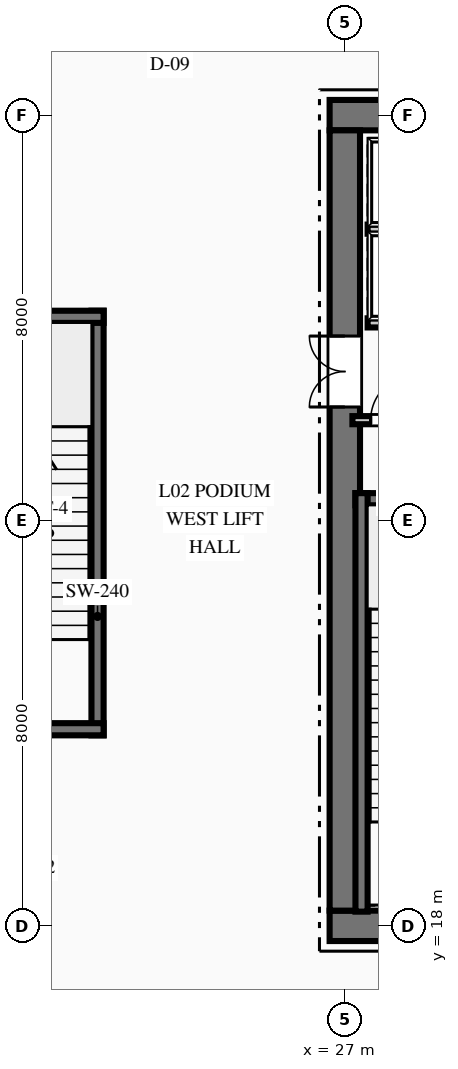
"""IFC4 building model, lengths in metres.
Left out: names, types, materials, properties, quantities, classifications, styles, units other than length and angle.
Written with IfcOpenShell. Run it as: python <this file> out.ifc"""

import sys

from ifc_helpers import new_model, si_unit, direction, frame, frame_2d, origin, place, context, subcontext, project, spatial, rectangle, extrude, element, fill, save


model = new_model("IFC4")
c1 = context("Model", 3, precision=1e-05, world=origin(), true_north=direction((0.0, 1.0)))
c2 = subcontext(c1, "Body", "Model", "MODEL_VIEW")
j1 = project(units=[si_unit("LENGTHUNIT", "METRE"), si_unit("PLANEANGLEUNIT", "RADIAN")], contexts=[c1])
p1 = place(None, origin())
s1 = spatial("IfcSite", under=j1, at=p1, CompositionType="ELEMENT")
p2 = place(p1, origin())
s2 = spatial("IfcBuilding", under=s1, at=p2, CompositionType="ELEMENT")
p3 = place(p2, frame((0.0, 0.0, 11.4)))
s3 = spatial("IfcBuildingStorey", under=s2, at=p3, CompositionType="ELEMENT", Elevation=11.4)
p4 = place(p3, frame((26.7, 18.0, 0.0), z_axis=(0.0, 0.0, 1.0), x_axis=(1.0, 0.0, 0.0)))
e1 = element("IfcWall", 1, at=p4, inside=s3, PredefinedType="SHEAR", context=c2, shape_type="SweptSolid", body=[
    extrude(rectangle(XDim=18.6, YDim=0.6, at=frame_2d((9.3, 0.0))), origin(), (0.0, 0.0, 1.0), 5.4),
])
p5 = place(p4, frame((7.4, 0.0, 0.0)))
e2 = element("IfcOpeningElement", 2, at=p5, cuts=e1, PredefinedType="OPENING", context=c2, shape_type="SweptSolid", body=[
    extrude(rectangle(XDim=1.1, YDim=2.15, at=frame_2d((0.55, 1.075))), frame((0.0, 0.31, 0.0), z_axis=(0.0, -1.0, 0.0), x_axis=(1.0, 0.0, 0.0)), (0.0, 0.0, 1.0), 0.62),
])
p6 = place(p4, frame((10.1, 0.0, 0.0)))
e3 = element("IfcOpeningElement", 3, at=p6, cuts=e1, PredefinedType="OPENING", context=c2, shape_type="SweptSolid", body=[
    extrude(rectangle(XDim=1.1, YDim=2.15, at=frame_2d((0.55, 1.075))), frame((0.0, 0.31, 0.0), z_axis=(0.0, -1.0, 0.0), x_axis=(1.0, 0.0, 0.0)), (0.0, 0.0, 1.0), 0.62),
])
p7 = place(p3, frame((26.7, 34.0, 0.0), z_axis=(0.0, 0.0, 1.0), x_axis=(1.0, 0.0, 0.0)))
e4 = element("IfcWall", 4, at=p7, inside=s3, PredefinedType="SHEAR", context=c2, shape_type="SweptSolid", body=[
    extrude(rectangle(XDim=18.6, YDim=0.6, at=frame_2d((9.3, 0.0))), origin(), (0.0, 0.0, 1.0), 5.4),
])
p8 = place(p7, frame((1.265, 0.0, 0.0)))
e5 = element("IfcOpeningElement", 5, at=p8, cuts=e4, PredefinedType="OPENING", context=c2, shape_type="SweptSolid", body=[
    extrude(rectangle(XDim=1.1, YDim=2.15, at=frame_2d((0.55, 1.075))), frame((0.0, 0.31, 0.0), z_axis=(0.0, -1.0, 0.0), x_axis=(1.0, 0.0, 0.0)), (0.0, 0.0, 1.0), 0.62),
])
p9 = place(p7, frame((3.515, 0.0, 0.0)))
e6 = element("IfcOpeningElement", 6, at=p9, cuts=e4, PredefinedType="OPENING", context=c2, shape_type="SweptSolid", body=[
    extrude(rectangle(XDim=1.1, YDim=2.15, at=frame_2d((0.55, 1.075))), frame((0.0, 0.31, 0.0), z_axis=(0.0, -1.0, 0.0), x_axis=(1.0, 0.0, 0.0)), (0.0, 0.0, 1.0), 0.62),
])
p10 = place(p7, frame((13.985, 0.0, 0.0)))
e7 = element("IfcOpeningElement", 7, at=p10, cuts=e4, PredefinedType="OPENING", context=c2, shape_type="SweptSolid", body=[
    extrude(rectangle(XDim=1.1, YDim=2.15, at=frame_2d((0.55, 1.075))), frame((0.0, 0.31, 0.0), z_axis=(0.0, -1.0, 0.0), x_axis=(1.0, 0.0, 0.0)), (0.0, 0.0, 1.0), 0.62),
])
p11 = place(p7, frame((16.235, 0.0, 0.0)))
e8 = element("IfcOpeningElement", 8, at=p11, cuts=e4, PredefinedType="OPENING", context=c2, shape_type="SweptSolid", body=[
    extrude(rectangle(XDim=1.1, YDim=2.15, at=frame_2d((0.55, 1.075))), frame((0.0, 0.31, 0.0), z_axis=(0.0, -1.0, 0.0), x_axis=(1.0, 0.0, 0.0)), (0.0, 0.0, 1.0), 0.62),
])
p12 = place(p3, frame((27.0, 18.3, 0.0), z_axis=(0.0, 0.0, 1.0), x_axis=(0.0, 1.0, 0.0)))
e9 = element("IfcWall", 9, at=p12, inside=s3, PredefinedType="SHEAR", context=c2, shape_type="SweptSolid", body=[
    extrude(rectangle(XDim=15.4, YDim=0.6, at=frame_2d((7.7, 0.0))), origin(), (0.0, 0.0, 1.0), 5.4),
])
p13 = place(p12, frame((9.94, 0.0, 0.0)))
e10 = element("IfcOpeningElement", 10, at=p13, cuts=e9, PredefinedType="OPENING", context=c2, shape_type="SweptSolid", body=[
    extrude(rectangle(XDim=1.4, YDim=2.2, at=frame_2d((0.7, 1.1))), frame((0.0, 0.31, 0.0), z_axis=(0.0, -1.0, 0.0), x_axis=(1.0, 0.0, 0.0)), (0.0, 0.0, 1.0), 0.62),
])
p14 = place(p3, frame((27.21, 26.42, 0.0), z_axis=(0.0, 0.0, 1.0), x_axis=(1.0, 0.0, 0.0)))
e11 = element("IfcWall", 11, at=p14, inside=s3, PredefinedType="SHEAR", context=c2, shape_type="SweptSolid", body=[
    extrude(rectangle(XDim=3.98, YDim=0.24, at=frame_2d((1.99, 0.0))), origin(), (0.0, 0.0, 1.0), 5.4),
])
p15 = place(p3, frame((27.33, 18.28, 0.0), z_axis=(0.0, 0.0, 1.0), x_axis=(0.0, 1.0, 0.0)))
e12 = element("IfcWall", 12, at=p15, inside=s3, PredefinedType="SHEAR", context=c2, shape_type="SweptSolid", body=[
    extrude(rectangle(XDim=8.26, YDim=0.24, at=frame_2d((4.13, 0.0))), origin(), (0.0, 0.0, 1.0), 5.4),
])
p16 = place(p3, frame((22.12, 21.76, 0.0), z_axis=(0.0, 0.0, 1.0), x_axis=(0.0, 1.0, 0.0)))
e13 = element("IfcWall", 13, at=p16, inside=s3, PredefinedType="SHEAR", context=c2, shape_type="SweptSolid", body=[
    extrude(rectangle(XDim=8.38, YDim=0.24, at=frame_2d((4.19, 0.0))), origin(), (0.0, 0.0, 1.0), 5.4),
])
p17 = place(p3, frame((18.26, 21.88, 0.0), z_axis=(0.0, 0.0, 1.0), x_axis=(1.0, 0.0, 0.0)))
e14 = element("IfcWall", 14, at=p17, inside=s3, PredefinedType="SHEAR", context=c2, shape_type="SweptSolid", body=[
    extrude(rectangle(XDim=3.98, YDim=0.24, at=frame_2d((1.99, 0.0))), origin(), (0.0, 0.0, 1.0), 5.4),
])
p18 = place(p17, frame((1.465, 0.0, 0.0)))
e15 = element("IfcOpeningElement", 15, at=p18, cuts=e14, PredefinedType="OPENING", context=c2, shape_type="SweptSolid", body=[
    extrude(rectangle(XDim=1.05, YDim=2.15, at=frame_2d((0.525, 1.075))), frame((0.0, 0.13, 0.0), z_axis=(0.0, -1.0, 0.0), x_axis=(1.0, 0.0, 0.0)), (0.0, 0.0, 1.0), 0.26),
])
p19 = place(p3, frame((18.26, 30.02, 0.0), z_axis=(0.0, 0.0, 1.0), x_axis=(1.0, 0.0, 0.0)))
e16 = element("IfcWall", 16, at=p19, inside=s3, PredefinedType="SHEAR", context=c2, shape_type="SweptSolid", body=[
    extrude(rectangle(XDim=3.98, YDim=0.24, at=frame_2d((1.99, 0.0))), origin(), (0.0, 0.0, 1.0), 5.4),
])
p20 = place(p3, frame((27.15, 27.98, 0.0), z_axis=(0.0, 0.0, 1.0), x_axis=(1.0, 0.0, 0.0)))
e17 = element("IfcWall", 17, at=p20, inside=s3, PredefinedType="PARTITIONING", context=c2, shape_type="SweptSolid", body=[
    extrude(rectangle(XDim=4.05, YDim=0.16, at=frame_2d((2.025, 0.0))), origin(), (0.0, 0.0, 1.0), 5.07),
])
p21 = place(p20, frame((0.36, 0.0, 0.0)))
e18 = element("IfcOpeningElement", 18, at=p21, cuts=e17, PredefinedType="OPENING", context=c2, shape_type="SweptSolid", body=[
    extrude(rectangle(XDim=0.9, YDim=2.15, at=frame_2d((0.45, 1.075))), frame((0.0, 0.09, 0.0), z_axis=(0.0, -1.0, 0.0), x_axis=(1.0, 0.0, 0.0)), (0.0, 0.0, 1.0), 0.18),
])
p22 = place(p20, frame((1.63, 0.0, 0.0)))
e19 = element("IfcOpeningElement", 19, at=p22, cuts=e17, PredefinedType="OPENING", context=c2, shape_type="SweptSolid", body=[
    extrude(rectangle(XDim=0.9, YDim=2.15, at=frame_2d((0.45, 1.075))), frame((0.0, 0.09, 0.0), z_axis=(0.0, -1.0, 0.0), x_axis=(1.0, 0.0, 0.0)), (0.0, 0.0, 1.0), 0.18),
])
p23 = place(p20, frame((2.788, 0.0, 0.0)))
e20 = element("IfcOpeningElement", 20, at=p23, cuts=e17, PredefinedType="OPENING", context=c2, shape_type="SweptSolid", body=[
    extrude(rectangle(XDim=0.9, YDim=2.15, at=frame_2d((0.45, 1.075))), frame((0.0, 0.09, 0.0), z_axis=(0.0, -1.0, 0.0), x_axis=(1.0, 0.0, 0.0)), (0.0, 0.0, 1.0), 0.18),
])
p24 = place(p3, frame((27.45, 29.9, 0.0), z_axis=(0.0, 0.0, 1.0), x_axis=(1.0, 0.0, 0.0)))
e21 = element("IfcWall", 21, at=p24, inside=s3, PredefinedType="PARTITIONING", context=c2, shape_type="SweptSolid", body=[
    extrude(rectangle(XDim=4.43, YDim=0.18, at=frame_2d((2.215, 0.0))), origin(), (0.0, 0.0, 1.0), 5.07),
])
p25 = place(p24, frame((0.515, 0.0, 0.0)))
e22 = element("IfcOpeningElement", 22, at=p25, cuts=e21, PredefinedType="OPENING", context=c2, shape_type="SweptSolid", body=[
    extrude(rectangle(XDim=1.1, YDim=2.15, at=frame_2d((0.55, 1.075))), frame((0.0, 0.1, 0.0), z_axis=(0.0, -1.0, 0.0), x_axis=(1.0, 0.0, 0.0)), (0.0, 0.0, 1.0), 0.2),
])
p26 = place(p24, frame((2.765, 0.0, 0.0)))
e23 = element("IfcOpeningElement", 23, at=p26, cuts=e21, PredefinedType="OPENING", context=c2, shape_type="SweptSolid", body=[
    extrude(rectangle(XDim=1.1, YDim=2.15, at=frame_2d((0.55, 1.075))), frame((0.0, 0.1, 0.0), z_axis=(0.0, -1.0, 0.0), x_axis=(1.0, 0.0, 0.0)), (0.0, 0.0, 1.0), 0.2),
])
p27 = place(p3, frame((27.45, 31.75, 0.0), z_axis=(0.0, 0.0, 1.0), x_axis=(1.0, 0.0, 0.0)))
e24 = element("IfcWall", 24, at=p27, inside=s3, PredefinedType="PARTITIONING", context=c2, shape_type="SweptSolid", body=[
    extrude(rectangle(XDim=4.43, YDim=0.18, at=frame_2d((2.215, 0.0))), origin(), (0.0, 0.0, 1.0), 5.07),
])
p28 = place(p21, origin())
e25 = element("IfcDoor", 25, at=p28, inside=s3, OperationType="SINGLE_SWING_RIGHT", PredefinedType="DOOR", context=c2, shape_type="SweptSolid", body=[
    extrude(rectangle(XDim=0.9, YDim=2.15, at=frame_2d((0.45, 1.075))), frame((0.0, 0.025, 0.0), z_axis=(0.0, -1.0, 0.0), x_axis=(1.0, 0.0, 0.0)), (0.0, 0.0, 1.0), 0.05),
])
fill(e18, e25)
p29 = place(p13, origin())
e26 = element("IfcDoor", 26, at=p29, inside=s3, OperationType="DOUBLE_DOOR_SINGLE_SWING", PredefinedType="DOOR", context=c2, shape_type="SweptSolid", body=[
    extrude(rectangle(XDim=1.4, YDim=2.2, at=frame_2d((0.7, 1.1))), frame((0.0, 0.025, 0.0), z_axis=(0.0, -1.0, 0.0), x_axis=(1.0, 0.0, 0.0)), (0.0, 0.0, 1.0), 0.05),
])
fill(e10, e26)
save(model, sys.argv[1])
